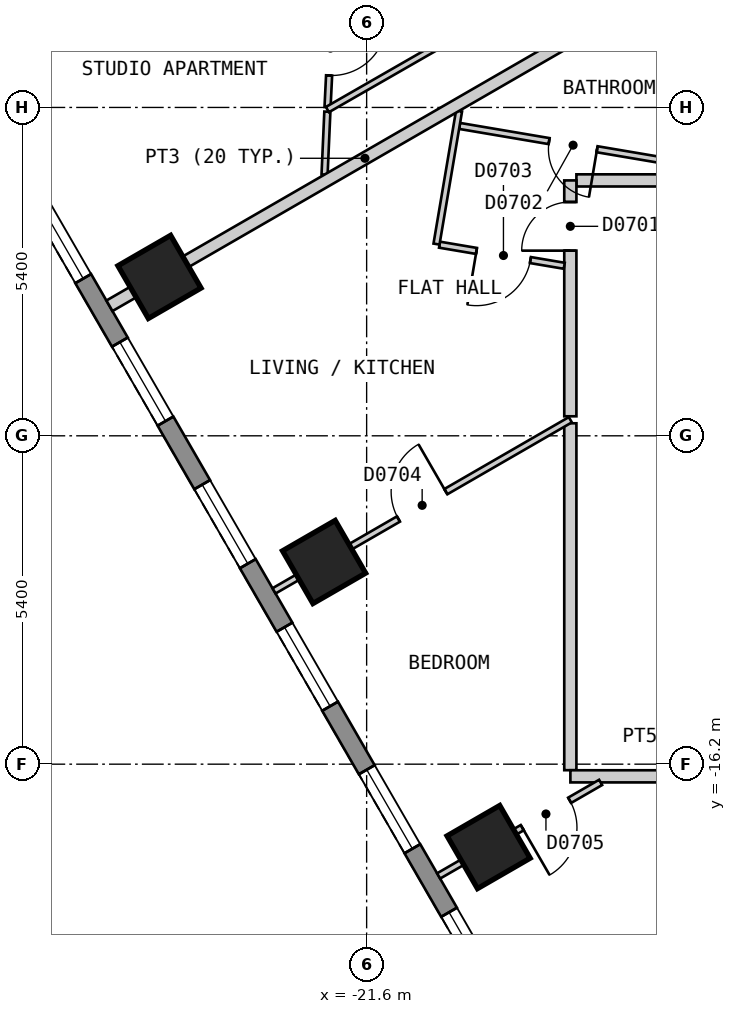
"""IFC4 building model, lengths in metres.
Left out: names, types, materials, properties, quantities, classifications, styles, units other than length and angle.
Written with IfcOpenShell. Run it as: python <this file> out.ifc"""

import sys

from ifc_helpers import new_model, si_unit, direction, frame, frame_2d, origin, origin_2d, place, context, subcontext, project, spatial, polyline, rectangle, outline, extrude, element, fill, save


model = new_model("IFC4")
c1 = context("Model", 3, precision=1e-05, world=origin(), true_north=direction((0.0, 1.0)))
c2 = subcontext(c1, "Body", "Model", "MODEL_VIEW")
j1 = project(units=[si_unit("LENGTHUNIT", "METRE"), si_unit("PLANEANGLEUNIT", "RADIAN")], contexts=[c1])
p1 = place(None, origin())
s1 = spatial("IfcSite", under=j1, at=p1, CompositionType="ELEMENT")
p2 = place(p1, origin())
s2 = spatial("IfcBuilding", under=s1, at=p2, CompositionType="ELEMENT")
p3 = place(p2, frame((0.0, 0.0, 93.0)))
s3 = spatial("IfcBuildingStorey", under=s2, at=p3, CompositionType="ELEMENT", Elevation=93.0)
for number, where, z_axis, x_axis in (
    (1, (-25.007, -8.187, 0.0), (0.0, 0.0, 1.0), (0.5, -0.866, 0.0)),
    (2, (-22.3, -12.875, 0.0), (0.0, 0.0, 1.0), (0.5, -0.866, 0.0)),
    (3, (-19.594, -17.563, 0.0), (0.0, 0.0, 1.0), (0.5, -0.866, 0.0)),
):
    element("IfcColumn", number, at=place(p3, frame(where, z_axis=z_axis, x_axis=x_axis)), inside=s3, PredefinedType="COLUMN", context=c2, shape_type="SweptSolid", body=[
        extrude(rectangle(XDim=1.0, YDim=1.0, at=origin_2d()), origin(), (0.0, 0.0, 1.0), 3.0),
    ])
p4 = place(p3, frame((-29.027, -3.425, 0.0), z_axis=(0.0, 0.0, 1.0), x_axis=(0.500035407905, -0.866004960056, 0.0)))
e4 = element("IfcWall", 4, at=p4, inside=s3, PredefinedType="SOLIDWALL", context=c2, shape_type="SweptSolid", body=[
    extrude(outline(polyline([(0.0, -0.15), (23.094, -0.15), (23.014, 0.15), (0.08, 0.15), (0.0, -0.15)])), origin(), (0.0, 0.0, 1.0), 2.7),
])
p5 = place(p4, frame((1.324, 0.0, 0.15)))
e5 = element("IfcOpeningElement", 5, at=p5, cuts=e4, PredefinedType="OPENING", context=c2, shape_type="SweptSolid", body=[
    extrude(rectangle(XDim=1.5, YDim=2.1, at=frame_2d((0.75, 1.05))), frame((0.0, 0.16, 0.0), z_axis=(0.0, -1.0, 0.0), x_axis=(1.0, 0.0, 0.0)), (0.0, 0.0, 1.0), 0.32),
])
p6 = place(p4, frame((4.031, 0.0, 0.15)))
e6 = element("IfcOpeningElement", 6, at=p6, cuts=e4, PredefinedType="OPENING", context=c2, shape_type="SweptSolid", body=[
    extrude(rectangle(XDim=1.5, YDim=2.1, at=frame_2d((0.75, 1.05))), frame((0.0, 0.16, 0.0), z_axis=(0.0, -1.0, 0.0), x_axis=(1.0, 0.0, 0.0)), (0.0, 0.0, 1.0), 0.32),
])
p7 = place(p4, frame((6.737, 0.0, 0.15)))
e7 = element("IfcOpeningElement", 7, at=p7, cuts=e4, PredefinedType="OPENING", context=c2, shape_type="SweptSolid", body=[
    extrude(rectangle(XDim=1.5, YDim=2.1, at=frame_2d((0.75, 1.05))), frame((0.0, 0.16, 0.0), z_axis=(0.0, -1.0, 0.0), x_axis=(1.0, 0.0, 0.0)), (0.0, 0.0, 1.0), 0.32),
])
p8 = place(p4, frame((9.444, 0.0, 0.15)))
e8 = element("IfcOpeningElement", 8, at=p8, cuts=e4, PredefinedType="OPENING", context=c2, shape_type="SweptSolid", body=[
    extrude(rectangle(XDim=1.5, YDim=2.1, at=frame_2d((0.75, 1.05))), frame((0.0, 0.16, 0.0), z_axis=(0.0, -1.0, 0.0), x_axis=(1.0, 0.0, 0.0)), (0.0, 0.0, 1.0), 0.32),
])
p9 = place(p4, frame((12.151, 0.0, 0.15)))
e9 = element("IfcOpeningElement", 9, at=p9, cuts=e4, PredefinedType="OPENING", context=c2, shape_type="SweptSolid", body=[
    extrude(rectangle(XDim=1.5, YDim=2.1, at=frame_2d((0.75, 1.05))), frame((0.0, 0.16, 0.0), z_axis=(0.0, -1.0, 0.0), x_axis=(1.0, 0.0, 0.0)), (0.0, 0.0, 1.0), 0.32),
])
p10 = place(p4, frame((14.857, 0.0, 0.15)))
e10 = element("IfcOpeningElement", 10, at=p10, cuts=e4, PredefinedType="OPENING", context=c2, shape_type="SweptSolid", body=[
    extrude(rectangle(XDim=1.5, YDim=2.1, at=frame_2d((0.75, 1.05))), frame((0.0, 0.16, 0.0), z_axis=(0.0, -1.0, 0.0), x_axis=(1.0, 0.0, 0.0)), (0.0, 0.0, 1.0), 0.32),
])
p11 = place(p4, frame((17.564, 0.0, 0.15)))
e11 = element("IfcOpeningElement", 11, at=p11, cuts=e4, PredefinedType="OPENING", context=c2, shape_type="SweptSolid", body=[
    extrude(rectangle(XDim=1.5, YDim=2.1, at=frame_2d((0.75, 1.05))), frame((0.0, 0.16, 0.0), z_axis=(0.0, -1.0, 0.0), x_axis=(1.0, 0.0, 0.0)), (0.0, 0.0, 1.0), 0.32),
])
p12 = place(p4, frame((20.27, 0.0, 0.15)))
e12 = element("IfcOpeningElement", 12, at=p12, cuts=e4, PredefinedType="OPENING", context=c2, shape_type="SweptSolid", body=[
    extrude(rectangle(XDim=1.5, YDim=2.1, at=frame_2d((0.75, 1.05))), frame((0.0, 0.16, 0.0), z_axis=(0.0, -1.0, 0.0), x_axis=(1.0, 0.0, 0.0)), (0.0, 0.0, 1.0), 0.32),
])
p13 = place(p3, frame((-16.855, -4.008, 0.0), z_axis=(0.0, 0.0, 1.0), x_axis=(0.500151474942, -0.865937932021, 0.0)))
e13 = element("IfcWall", 13, at=p13, inside=s3, PredefinedType="PARTITIONING", context=c2, shape_type="SweptSolid", body=[
    extrude(rectangle(XDim=2.709, YDim=0.2, at=frame_2d((1.354, 0.0))), origin(), (0.0, 0.0, 1.0), 2.7),
])
p14 = place(p3, frame((-18.25, -10.594, 0.0), z_axis=(0.0, 0.0, 1.0), x_axis=(0.0, -1.0, 0.0)))
e14 = element("IfcWall", 14, at=p14, inside=s3, PredefinedType="PARTITIONING", context=c2, shape_type="SweptSolid", body=[
    extrude(rectangle(XDim=5.705, YDim=0.2, at=frame_2d((2.853, 0.0))), origin(), (0.0, 0.0, 1.0), 2.7),
])
p15 = place(p3, frame((-18.15, -6.6, 0.0), z_axis=(0.0, 0.0, 1.0), x_axis=(1.0, 0.0, 0.0)))
e15 = element("IfcWall", 15, at=p15, inside=s3, PredefinedType="PARTITIONING", context=c2, shape_type="SweptSolid", body=[
    extrude(rectangle(XDim=2.649, YDim=0.2, at=frame_2d((1.324, 0.0))), origin(), (0.0, 0.0, 1.0), 2.7),
])
p16 = place(p3, frame((-18.249, -16.4, 0.0), z_axis=(0.0, 0.0, 1.0), x_axis=(1.0, 0.0, 0.0)))
e16 = element("IfcWall", 16, at=p16, inside=s3, PredefinedType="PARTITIONING", context=c2, shape_type="SweptSolid", body=[
    extrude(rectangle(XDim=2.748, YDim=0.2, at=frame_2d((1.374, 0.0))), origin(), (0.0, 0.0, 1.0), 2.7),
])
p17 = place(p3, frame((-18.25, -10.479, 0.0), z_axis=(0.0, 0.0, 1.0), x_axis=(0.0, 1.0, 0.0)))
e17 = element("IfcWall", 17, at=p17, inside=s3, PredefinedType="PARTITIONING", context=c2, shape_type="SweptSolid", body=[
    extrude(rectangle(XDim=3.879, YDim=0.2, at=frame_2d((1.939, 0.0))), origin(), (0.0, 0.0, 1.0), 2.7),
])
p18 = place(p17, frame((2.724, 0.0, 0.0)))
e18 = element("IfcOpeningElement", 18, at=p18, cuts=e17, PredefinedType="OPENING", context=c2, shape_type="SweptSolid", body=[
    extrude(rectangle(XDim=0.8, YDim=2.1, at=frame_2d((0.4, 1.05))), frame((0.0, 0.11, 0.0), z_axis=(0.0, -1.0, 0.0), x_axis=(1.0, 0.0, 0.0)), (0.0, 0.0, 1.0), 0.22),
])
p19 = place(p3, frame((-20.071, -5.704, 0.0), z_axis=(0.0, 0.0, 1.0), x_axis=(0.985933263306, -0.16713946364, 0.0)))
e19 = element("IfcWall", 19, at=p19, inside=s3, PredefinedType="PARTITIONING", context=c2, shape_type="SweptSolid", body=[
    extrude(rectangle(XDim=4.636, YDim=0.1, at=frame_2d((2.318, 0.0))), origin(), (0.0, 0.0, 1.0), 2.7),
])
p20 = place(p19, frame((1.493, 0.0, 0.0)))
e20 = element("IfcOpeningElement", 20, at=p20, cuts=e19, PredefinedType="OPENING", context=c2, shape_type="SweptSolid", body=[
    extrude(rectangle(XDim=0.8, YDim=2.1, at=frame_2d((0.4, 1.05))), frame((0.0, 0.06, 0.0), z_axis=(0.0, -1.0, 0.0), x_axis=(1.0, 0.0, 0.0)), (0.0, 0.0, 1.0), 0.12),
])
p21 = place(p3, frame((-20.401, -7.657, 0.0), z_axis=(0.0, 0.0, 1.0), x_axis=(0.985991281902, -0.166796858522, 0.0)))
e21 = element("IfcWall", 21, at=p21, inside=s3, PredefinedType="PARTITIONING", context=c2, shape_type="SweptSolid", body=[
    extrude(rectangle(XDim=2.08, YDim=0.1, at=frame_2d((1.04, 0.0))), origin(), (0.0, 0.0, 1.0), 2.7),
])
p22 = place(p21, frame((0.616, 0.0, 0.0)))
e22 = element("IfcOpeningElement", 22, at=p22, cuts=e21, PredefinedType="OPENING", context=c2, shape_type="SweptSolid", body=[
    extrude(rectangle(XDim=0.9, YDim=2.1, at=frame_2d((0.45, 1.05))), frame((0.0, 0.06, 0.0), z_axis=(0.0, -1.0, 0.0), x_axis=(1.0, 0.0, 0.0)), (0.0, 0.0, 1.0), 0.12),
])
p23 = place(p3, frame((-20.451, -7.647, 0.0), z_axis=(0.0, 0.0, 1.0), x_axis=(0.167037570483, 0.985950531237, 0.0)))
e23 = element("IfcWall", 23, at=p23, inside=s3, PredefinedType="PARTITIONING", context=c2, shape_type="SweptSolid", body=[
    extrude(rectangle(XDim=2.22, YDim=0.1, at=frame_2d((1.11, 0.0))), origin(), (0.0, 0.0, 1.0), 2.7),
])
p24 = place(p3, frame((-22.243, -5.395, 0.0), z_axis=(0.0, 0.0, 1.0), x_axis=(0.049092933256, 0.998794214993, 0.0)))
e24 = element("IfcWall", 24, at=p24, inside=s3, PredefinedType="PARTITIONING", context=c2, shape_type="SweptSolid", body=[
    extrude(rectangle(XDim=2.422, YDim=0.1, at=frame_2d((1.211, 0.0))), origin(), (0.0, 0.0, 1.0), 2.7),
])
p25 = place(p24, frame((0.522, 0.0, 0.0)))
e25 = element("IfcOpeningElement", 25, at=p25, cuts=e24, PredefinedType="OPENING", context=c2, shape_type="SweptSolid", body=[
    extrude(rectangle(XDim=0.9, YDim=2.1, at=frame_2d((0.45, 1.05))), frame((0.0, 0.06, 0.0), z_axis=(0.0, -1.0, 0.0), x_axis=(1.0, 0.0, 0.0)), (0.0, 0.0, 1.0), 0.12),
])
p26 = place(p3, frame((-22.292, -6.504, 0.0), z_axis=(0.0, 0.0, 1.0), x_axis=(0.04434829575, 0.999016130332, 0.0)))
e26 = element("IfcWall", 26, at=p26, inside=s3, PredefinedType="PARTITIONING", context=c2, shape_type="SweptSolid", body=[
    extrude(rectangle(XDim=1.035, YDim=0.1, at=frame_2d((0.518, 0.0))), origin(), (0.0, 0.0, 1.0), 2.7),
])
p27 = place(p3, frame((-20.416, -18.038, 0.0), z_axis=(0.0, 0.0, 1.0), x_axis=(0.866026989333, 0.499997253739, 0.0)))
e27 = element("IfcWall", 27, at=p27, inside=s3, PredefinedType="PARTITIONING", context=c2, shape_type="SweptSolid", body=[
    extrude(rectangle(XDim=3.076, YDim=0.1, at=frame_2d((1.538, 0.0))), origin(), (0.0, 0.0, 1.0), 2.7),
])
p28 = place(p27, frame((1.588, 0.0, 0.0)))
e28 = element("IfcOpeningElement", 28, at=p28, cuts=e27, PredefinedType="OPENING", context=c2, shape_type="SweptSolid", body=[
    extrude(rectangle(XDim=0.9, YDim=2.1, at=frame_2d((0.45, 1.05))), frame((0.0, 0.06, 0.0), z_axis=(0.0, -1.0, 0.0), x_axis=(1.0, 0.0, 0.0)), (0.0, 0.0, 1.0), 0.12),
])
p29 = place(p3, frame((-23.123, -13.35, 0.0), z_axis=(0.0, 0.0, 1.0), x_axis=(0.86596737403, 0.500100497016, 0.0)))
e29 = element("IfcWall", 29, at=p29, inside=s3, PredefinedType="PARTITIONING", context=c2, shape_type="SweptSolid", body=[
    extrude(rectangle(XDim=5.627, YDim=0.1, at=frame_2d((2.813, 0.0))), origin(), (0.0, 0.0, 1.0), 2.7),
])
p30 = place(p29, frame((2.363, 0.0, 0.0)))
e30 = element("IfcOpeningElement", 30, at=p30, cuts=e29, PredefinedType="OPENING", context=c2, shape_type="SweptSolid", body=[
    extrude(rectangle(XDim=0.9, YDim=2.1, at=frame_2d((0.45, 1.05))), frame((0.0, 0.06, 0.0), z_axis=(0.0, -1.0, 0.0), x_axis=(1.0, 0.0, 0.0)), (0.0, 0.0, 1.0), 0.12),
])
p31 = place(p3, frame((-22.245, -5.435, 0.0), z_axis=(0.0, 0.0, 1.0), x_axis=(0.867311485465, 0.497765795511, 0.0)))
e31 = element("IfcWall", 31, at=p31, inside=s3, PredefinedType="PARTITIONING", context=c2, shape_type="SweptSolid", body=[
    extrude(rectangle(XDim=5.282, YDim=0.1, at=frame_2d((2.641, 0.0))), origin(), (0.0, 0.0, 1.0), 2.7),
])
p32 = place(p31, frame((2.291, 0.0, 0.0)))
e32 = element("IfcOpeningElement", 32, at=p32, cuts=e31, PredefinedType="OPENING", context=c2, shape_type="SweptSolid", body=[
    extrude(rectangle(XDim=0.8, YDim=2.1, at=frame_2d((0.4, 1.05))), frame((0.0, 0.06, 0.0), z_axis=(0.0, -1.0, 0.0), x_axis=(1.0, 0.0, 0.0)), (0.0, 0.0, 1.0), 0.12),
])
p33 = place(p3, frame((-25.83, -8.662, 0.0), z_axis=(0.0, 0.0, 1.0), x_axis=(0.866026801646, 0.499997578825, 0.0)))
e33 = element("IfcWall", 33, at=p33, inside=s3, PredefinedType="PARTITIONING", context=c2, shape_type="SweptSolid", body=[
    extrude(rectangle(XDim=9.704, YDim=0.2, at=frame_2d((4.852, 0.0))), origin(), (0.0, 0.0, 1.0), 2.7),
])
p34 = place(p6, origin())
e34 = element("IfcWindow", 34, at=p34, inside=s3, PartitioningType="SINGLE_PANEL", PredefinedType="WINDOW", context=c2, shape_type="SweptSolid", body=[
    extrude(rectangle(XDim=1.5, YDim=2.1, at=frame_2d((0.75, 1.05))), frame((0.0, 0.03, 0.0), z_axis=(0.0, -1.0, 0.0), x_axis=(1.0, 0.0, 0.0)), (0.0, 0.0, 1.0), 0.06),
])
fill(e6, e34)
p35 = place(p7, origin())
e35 = element("IfcWindow", 35, at=p35, inside=s3, PartitioningType="SINGLE_PANEL", PredefinedType="WINDOW", context=c2, shape_type="SweptSolid", body=[
    extrude(rectangle(XDim=1.5, YDim=2.1, at=frame_2d((0.75, 1.05))), frame((0.0, 0.03, 0.0), z_axis=(0.0, -1.0, 0.0), x_axis=(1.0, 0.0, 0.0)), (0.0, 0.0, 1.0), 0.06),
])
fill(e7, e35)
p36 = place(p8, origin())
e36 = element("IfcWindow", 36, at=p36, inside=s3, PartitioningType="SINGLE_PANEL", PredefinedType="WINDOW", context=c2, shape_type="SweptSolid", body=[
    extrude(rectangle(XDim=1.5, YDim=2.1, at=frame_2d((0.75, 1.05))), frame((0.0, 0.03, 0.0), z_axis=(0.0, -1.0, 0.0), x_axis=(1.0, 0.0, 0.0)), (0.0, 0.0, 1.0), 0.06),
])
fill(e8, e36)
p37 = place(p9, origin())
e37 = element("IfcWindow", 37, at=p37, inside=s3, PartitioningType="SINGLE_PANEL", PredefinedType="WINDOW", context=c2, shape_type="SweptSolid", body=[
    extrude(rectangle(XDim=1.5, YDim=2.1, at=frame_2d((0.75, 1.05))), frame((0.0, 0.03, 0.0), z_axis=(0.0, -1.0, 0.0), x_axis=(1.0, 0.0, 0.0)), (0.0, 0.0, 1.0), 0.06),
])
fill(e9, e37)
p38 = place(p10, origin())
e38 = element("IfcWindow", 38, at=p38, inside=s3, PartitioningType="SINGLE_PANEL", PredefinedType="WINDOW", context=c2, shape_type="SweptSolid", body=[
    extrude(rectangle(XDim=1.5, YDim=2.1, at=frame_2d((0.75, 1.05))), frame((0.0, 0.03, 0.0), z_axis=(0.0, -1.0, 0.0), x_axis=(1.0, 0.0, 0.0)), (0.0, 0.0, 1.0), 0.06),
])
fill(e10, e38)
p39 = place(p11, origin())
e39 = element("IfcWindow", 39, at=p39, inside=s3, PartitioningType="SINGLE_PANEL", PredefinedType="WINDOW", context=c2, shape_type="SweptSolid", body=[
    extrude(rectangle(XDim=1.5, YDim=2.1, at=frame_2d((0.75, 1.05))), frame((0.0, 0.03, 0.0), z_axis=(0.0, -1.0, 0.0), x_axis=(1.0, 0.0, 0.0)), (0.0, 0.0, 1.0), 0.06),
])
fill(e11, e39)
p40 = place(p18, origin())
e40 = element("IfcDoor", 40, at=p40, inside=s3, OperationType="SINGLE_SWING_LEFT", PredefinedType="DOOR", context=c2, shape_type="SweptSolid", body=[
    extrude(rectangle(XDim=0.8, YDim=2.1, at=frame_2d((0.4, 1.05))), frame((0.0, 0.025, 0.0), z_axis=(0.0, -1.0, 0.0), x_axis=(1.0, 0.0, 0.0)), (0.0, 0.0, 1.0), 0.05),
])
fill(e18, e40)
p41 = place(p20, origin())
e41 = element("IfcDoor", 41, at=p41, inside=s3, OperationType="SINGLE_SWING_RIGHT", PredefinedType="DOOR", context=c2, shape_type="SweptSolid", body=[
    extrude(rectangle(XDim=0.8, YDim=2.1, at=frame_2d((0.4, 1.05))), frame((0.0, 0.025, 0.0), z_axis=(0.0, -1.0, 0.0), x_axis=(1.0, 0.0, 0.0)), (0.0, 0.0, 1.0), 0.05),
])
fill(e20, e41)
p42 = place(p22, origin())
e42 = element("IfcDoor", 42, at=p42, inside=s3, OperationType="SINGLE_SWING_LEFT", PredefinedType="DOOR", context=c2, shape_type="SweptSolid", body=[
    extrude(rectangle(XDim=0.9, YDim=2.1, at=frame_2d((0.45, 1.05))), frame((0.0, 0.025, 0.0), z_axis=(0.0, -1.0, 0.0), x_axis=(1.0, 0.0, 0.0)), (0.0, 0.0, 1.0), 0.05),
])
fill(e22, e42)
p43 = place(p30, origin())
e43 = element("IfcDoor", 43, at=p43, inside=s3, OperationType="SINGLE_SWING_RIGHT", PredefinedType="DOOR", context=c2, shape_type="SweptSolid", body=[
    extrude(rectangle(XDim=0.9, YDim=2.1, at=frame_2d((0.45, 1.05))), frame((0.0, 0.025, 0.0), z_axis=(0.0, -1.0, 0.0), x_axis=(1.0, 0.0, 0.0)), (0.0, 0.0, 1.0), 0.05),
])
fill(e30, e43)
p44 = place(p28, origin())
e44 = element("IfcDoor", 44, at=p44, inside=s3, OperationType="SINGLE_SWING_LEFT", PredefinedType="DOOR", context=c2, shape_type="SweptSolid", body=[
    extrude(rectangle(XDim=0.9, YDim=2.1, at=frame_2d((0.45, 1.05))), frame((0.0, 0.025, 0.0), z_axis=(0.0, -1.0, 0.0), x_axis=(1.0, 0.0, 0.0)), (0.0, 0.0, 1.0), 0.05),
])
fill(e28, e44)
p45 = place(p25, origin())
e45 = element("IfcDoor", 45, at=p45, inside=s3, OperationType="SINGLE_SWING_RIGHT", PredefinedType="DOOR", context=c2, shape_type="SweptSolid", body=[
    extrude(rectangle(XDim=0.9, YDim=2.1, at=frame_2d((0.45, 1.05))), frame((0.0, 0.025, 0.0), z_axis=(0.0, -1.0, 0.0), x_axis=(1.0, 0.0, 0.0)), (0.0, 0.0, 1.0), 0.05),
])
fill(e25, e45)
save(model, sys.argv[1])
